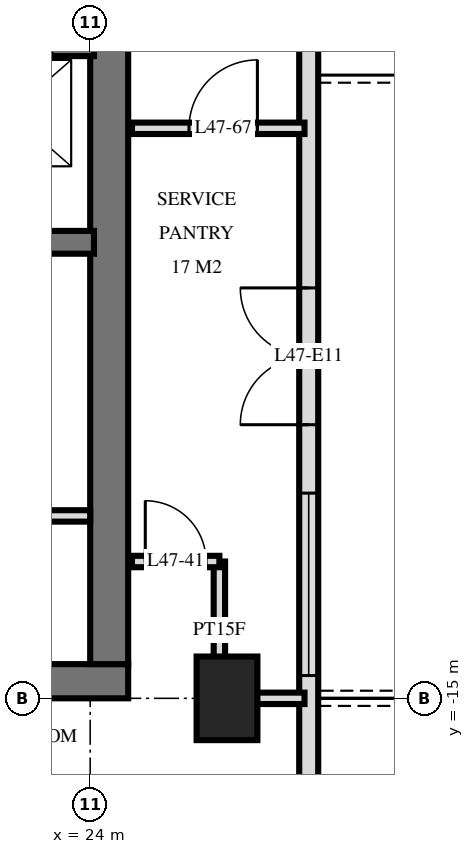
"""IFC4 building model, lengths in metres.
Left out: names, types, materials, properties, quantities, classifications, styles, units other than length and angle.
Written with IfcOpenShell. Run it as: python <this file> out.ifc"""

import sys

from ifc_helpers import new_model, si_unit, direction, frame, frame_2d, origin, origin_2d, place, context, subcontext, project, spatial, rectangle, extrude, element, fill, save


model = new_model("IFC4")
c1 = context("Model", 3, precision=1e-05, world=origin(), true_north=direction((0.0, 1.0)))
c2 = subcontext(c1, "Body", "Model", "MODEL_VIEW")
j1 = project(units=[si_unit("LENGTHUNIT", "METRE"), si_unit("PLANEANGLEUNIT", "RADIAN")], contexts=[c1])
p1 = place(None, origin())
s1 = spatial("IfcSite", under=j1, at=p1, CompositionType="ELEMENT")
p2 = place(p1, origin())
s2 = spatial("IfcBuilding", under=s1, at=p2, CompositionType="ELEMENT")
p3 = place(p2, frame((0.0, 0.0, 183.6)))
s3 = spatial("IfcBuildingStorey", under=s2, at=p3, CompositionType="ELEMENT", Elevation=183.6)
p4 = place(p3, frame((25.8, -15.0, -0.28), z_axis=(0.0, 0.0, 1.0), x_axis=(0.0, 1.0, 0.0)))
e1 = element("IfcColumn", 1, at=p4, inside=s3, PredefinedType="COLUMN", context=c2, shape_type="SweptSolid", body=[
    extrude(rectangle(XDim=1.1, YDim=0.8, at=origin_2d()), origin(), (0.0, 0.0, 1.0), 3.78),
])
p5 = place(p3, frame((10.0, -14.775, 0.0), z_axis=(0.0, 0.0, 1.0), x_axis=(1.0, 0.0, 0.0)))
e2 = element("IfcWall", 2, at=p5, inside=s3, PredefinedType="SHEAR", context=c2, shape_type="SweptSolid", body=[
    extrude(rectangle(XDim=14.5, YDim=0.45, at=frame_2d((7.25, 0.0))), origin(), (0.0, 0.0, 1.0), 3.5),
])
p6 = place(p5, frame((7.1, 0.0, 0.0)))
e3 = element("IfcOpeningElement", 3, at=p6, cuts=e2, PredefinedType="OPENING", context=c2, shape_type="SweptSolid", body=[
    extrude(rectangle(XDim=1.2, YDim=2.1, at=frame_2d((0.6, 1.05))), frame((0.0, 0.235, 0.0), z_axis=(0.0, -1.0, 0.0), x_axis=(1.0, 0.0, 0.0)), (0.0, 0.0, 1.0), 0.47),
])
p7 = place(p5, frame((4.15, 0.0, 0.0)))
e4 = element("IfcOpeningElement", 4, at=p7, cuts=e2, PredefinedType="OPENING", context=c2, shape_type="SweptSolid", body=[
    extrude(rectangle(XDim=1.1, YDim=2.1, at=frame_2d((0.55, 1.05))), frame((0.0, 0.235, 0.0), z_axis=(0.0, -1.0, 0.0), x_axis=(1.0, 0.0, 0.0)), (0.0, 0.0, 1.0), 0.47),
])
p8 = place(p5, frame((10.1, 0.0, 0.0)))
e5 = element("IfcOpeningElement", 5, at=p8, cuts=e2, PredefinedType="OPENING", context=c2, shape_type="SweptSolid", body=[
    extrude(rectangle(XDim=0.9, YDim=2.1, at=frame_2d((0.45, 1.05))), frame((0.0, 0.235, 0.0), z_axis=(0.0, -1.0, 0.0), x_axis=(1.0, 0.0, 0.0)), (0.0, 0.0, 1.0), 0.47),
])
p9 = place(p5, frame((12.45, 0.0, 0.0)))
e6 = element("IfcOpeningElement", 6, at=p9, cuts=e2, PredefinedType="OPENING", context=c2, shape_type="SweptSolid", body=[
    extrude(rectangle(XDim=1.0, YDim=2.1, at=frame_2d((0.5, 1.05))), frame((0.0, 0.235, 0.0), z_axis=(0.0, -1.0, 0.0), x_axis=(1.0, 0.0, 0.0)), (0.0, 0.0, 1.0), 0.47),
])
p10 = place(p3, frame((24.25, -14.55, 0.0), z_axis=(0.0, 0.0, 1.0), x_axis=(0.0, 1.0, 0.0)))
e7 = element("IfcWall", 7, at=p10, inside=s3, PredefinedType="SHEAR", context=c2, shape_type="SweptSolid", body=[
    extrude(rectangle(XDim=14.1, YDim=0.5, at=frame_2d((7.05, 0.0))), origin(), (0.0, 0.0, 1.0), 3.5),
])
p11 = place(p3, frame((10.35, -6.4, 0.0), z_axis=(0.0, 0.0, 1.0), x_axis=(1.0, 0.0, 0.0)))
e8 = element("IfcWall", 8, at=p11, inside=s3, PredefinedType="SHEAR", context=c2, shape_type="SweptSolid", body=[
    extrude(rectangle(XDim=13.7, YDim=0.3, at=frame_2d((6.85, 0.0))), origin(), (0.0, 0.0, 1.0), 3.5),
])
p12 = place(p11, frame((12.05, 0.0, 0.0)))
e9 = element("IfcOpeningElement", 9, at=p12, cuts=e8, PredefinedType="OPENING", context=c2, shape_type="SweptSolid", body=[
    extrude(rectangle(XDim=1.1, YDim=2.1, at=frame_2d((0.55, 1.05))), frame((0.0, 0.16, 0.0), z_axis=(0.0, -1.0, 0.0), x_axis=(1.0, 0.0, 0.0)), (0.0, 0.0, 1.0), 0.32),
])
p13 = place(p11, frame((6.8, 0.0, 0.0)))
e10 = element("IfcOpeningElement", 10, at=p13, cuts=e8, PredefinedType="OPENING", context=c2, shape_type="SweptSolid", body=[
    extrude(rectangle(XDim=1.1, YDim=2.1, at=frame_2d((0.55, 1.05))), frame((0.0, 0.16, 0.0), z_axis=(0.0, -1.0, 0.0), x_axis=(1.0, 0.0, 0.0)), (0.0, 0.0, 1.0), 0.32),
])
p14 = place(p3, frame((10.35, -9.0, 0.0), z_axis=(0.0, 0.0, 1.0), x_axis=(1.0, 0.0, 0.0)))
e11 = element("IfcWall", 11, at=p14, inside=s3, PredefinedType="SHEAR", context=c2, shape_type="SweptSolid", body=[
    extrude(rectangle(XDim=13.7, YDim=0.3, at=frame_2d((6.85, 0.0))), origin(), (0.0, 0.0, 1.0), 3.5),
])
p15 = place(p14, frame((3.8, 0.0, 0.0)))
e12 = element("IfcOpeningElement", 12, at=p15, cuts=e11, PredefinedType="OPENING", context=c2, shape_type="SweptSolid", body=[
    extrude(rectangle(XDim=1.1, YDim=2.1, at=frame_2d((0.55, 1.05))), frame((0.0, 0.16, 0.0), z_axis=(0.0, -1.0, 0.0), x_axis=(1.0, 0.0, 0.0)), (0.0, 0.0, 1.0), 0.32),
])
p16 = place(p3, frame((26.875, -24.875, 0.0), z_axis=(0.0, 0.0, 1.0), x_axis=(0.0, 1.0, 0.0)))
e13 = element("IfcWall", 13, at=p16, inside=s3, PredefinedType="SOLIDWALL", context=c2, shape_type="SweptSolid", body=[
    extrude(rectangle(XDim=21.551, YDim=0.25, at=frame_2d((10.775, 0.0))), origin(), (0.0, 0.0, 1.0), 3.22),
])
p17 = place(p16, frame((0.575, 0.0, 0.0)))
e14 = element("IfcOpeningElement", 14, at=p17, cuts=e13, PredefinedType="OPENING", context=c2, shape_type="SweptSolid", body=[
    extrude(rectangle(XDim=1.8, YDim=2.4, at=frame_2d((0.9, 1.2))), frame((0.0, 0.135, 0.0), z_axis=(0.0, -1.0, 0.0), x_axis=(1.0, 0.0, 0.0)), (0.0, 0.0, 1.0), 0.27),
])
p18 = place(p16, frame((5.675, 0.0, 0.0)))
e15 = element("IfcOpeningElement", 15, at=p18, cuts=e13, PredefinedType="OPENING", context=c2, shape_type="SweptSolid", body=[
    extrude(rectangle(XDim=1.8, YDim=2.4, at=frame_2d((0.9, 1.2))), frame((0.0, 0.135, 0.0), z_axis=(0.0, -1.0, 0.0), x_axis=(1.0, 0.0, 0.0)), (0.0, 0.0, 1.0), 0.27),
])
p19 = place(p16, frame((10.175, 0.0, 0.9)))
e16 = element("IfcOpeningElement", 16, at=p19, cuts=e13, PredefinedType="OPENING", context=c2, shape_type="SweptSolid", body=[
    extrude(rectangle(XDim=2.4, YDim=1.5, at=frame_2d((1.2, 0.75))), frame((0.0, 0.135, 0.0), z_axis=(0.0, -1.0, 0.0), x_axis=(1.0, 0.0, 0.0)), (0.0, 0.0, 1.0), 0.27),
])
p20 = place(p16, frame((13.475, 0.0, 0.0)))
e17 = element("IfcOpeningElement", 17, at=p20, cuts=e13, PredefinedType="OPENING", context=c2, shape_type="SweptSolid", body=[
    extrude(rectangle(XDim=1.8, YDim=2.4, at=frame_2d((0.9, 1.2))), frame((0.0, 0.135, 0.0), z_axis=(0.0, -1.0, 0.0), x_axis=(1.0, 0.0, 0.0)), (0.0, 0.0, 1.0), 0.27),
])
p21 = place(p3, frame((21.9, -12.6, 0.0), z_axis=(0.0, 0.0, 1.0), x_axis=(1.0, 0.0, 0.0)))
e18 = element("IfcWall", 18, at=p21, inside=s3, PredefinedType="PARTITIONING", context=c2, shape_type="SweptSolid", body=[
    extrude(rectangle(XDim=2.1, YDim=0.15, at=frame_2d((1.05, 0.0))), origin(), (0.0, 0.0, 1.0), 3.2),
])
p22 = place(p21, frame((0.55, 0.0, 0.0)))
e19 = element("IfcOpeningElement", 19, at=p22, cuts=e18, PredefinedType="OPENING", context=c2, shape_type="SweptSolid", body=[
    extrude(rectangle(XDim=1.0, YDim=2.1, at=frame_2d((0.5, 1.05))), frame((0.0, 0.085, 0.0), z_axis=(0.0, -1.0, 0.0), x_axis=(1.0, 0.0, 0.0)), (0.0, 0.0, 1.0), 0.17),
])
p23 = place(p3, frame((25.7, -15.0, 0.0), z_axis=(0.0, 0.0, 1.0), x_axis=(0.0, 1.0, 0.0)))
e20 = element("IfcWall", 20, at=p23, inside=s3, PredefinedType="PARTITIONING", context=c2, shape_type="SweptSolid", body=[
    extrude(rectangle(XDim=1.8, YDim=0.15, at=frame_2d((0.9, 0.0))), origin(), (0.0, 0.0, 1.0), 3.22),
])
p24 = place(p3, frame((25.7, -15.0, 0.0), z_axis=(0.0, 0.0, 1.0), x_axis=(1.0, 0.0, 0.0)))
e21 = element("IfcWall", 21, at=p24, inside=s3, PredefinedType="PARTITIONING", context=c2, shape_type="SweptSolid", body=[
    extrude(rectangle(XDim=1.12, YDim=0.15, at=frame_2d((0.56, 0.0))), origin(), (0.0, 0.0, 1.0), 3.22),
])
p25 = place(p3, frame((24.55, -13.2, 0.0), z_axis=(0.0, 0.0, 1.0), x_axis=(1.0, 0.0, 0.0)))
e22 = element("IfcWall", 22, at=p25, inside=s3, PredefinedType="PARTITIONING", context=c2, shape_type="SweptSolid", body=[
    extrude(rectangle(XDim=1.15, YDim=0.15, at=frame_2d((0.575, 0.0))), origin(), (0.0, 0.0, 1.0), 3.22),
])
p26 = place(p25, frame((0.175, 0.0, 0.0)))
e23 = element("IfcOpeningElement", 23, at=p26, cuts=e22, PredefinedType="OPENING", context=c2, shape_type="SweptSolid", body=[
    extrude(rectangle(XDim=0.8, YDim=2.1, at=frame_2d((0.4, 1.05))), frame((0.0, 0.085, 0.0), z_axis=(0.0, -1.0, 0.0), x_axis=(1.0, 0.0, 0.0)), (0.0, 0.0, 1.0), 0.17),
])
p27 = place(p3, frame((24.55, -7.5, 0.0), z_axis=(0.0, 0.0, 1.0), x_axis=(1.0, 0.0, 0.0)))
e24 = element("IfcWall", 24, at=p27, inside=s3, PredefinedType="PARTITIONING", context=c2, shape_type="SweptSolid", body=[
    extrude(rectangle(XDim=2.27, YDim=0.15, at=frame_2d((1.135, 0.0))), origin(), (0.0, 0.0, 1.0), 3.22),
])
p28 = place(p27, frame((0.75, 0.0, 0.0)))
e25 = element("IfcOpeningElement", 25, at=p28, cuts=e24, PredefinedType="OPENING", context=c2, shape_type="SweptSolid", body=[
    extrude(rectangle(XDim=0.9, YDim=2.1, at=frame_2d((0.45, 1.05))), frame((0.0, 0.085, 0.0), z_axis=(0.0, -1.0, 0.0), x_axis=(1.0, 0.0, 0.0)), (0.0, 0.0, 1.0), 0.17),
])
p29 = place(p19, origin())
e26 = element("IfcWindow", 26, at=p29, inside=s3, PartitioningType="SINGLE_PANEL", PredefinedType="WINDOW", context=c2, shape_type="SweptSolid", body=[
    extrude(rectangle(XDim=2.4, YDim=1.5, at=frame_2d((1.2, 0.75))), frame((0.0, 0.03, 0.0), z_axis=(0.0, -1.0, 0.0), x_axis=(1.0, 0.0, 0.0)), (0.0, 0.0, 1.0), 0.06),
])
fill(e16, e26)
p30 = place(p20, origin())
e27 = element("IfcDoor", 27, at=p30, inside=s3, OperationType="DOUBLE_DOOR_SINGLE_SWING", PredefinedType="DOOR", context=c2, shape_type="SweptSolid", body=[
    extrude(rectangle(XDim=1.8, YDim=2.4, at=frame_2d((0.9, 1.2))), frame((0.0, 0.025, 0.0), z_axis=(0.0, -1.0, 0.0), x_axis=(1.0, 0.0, 0.0)), (0.0, 0.0, 1.0), 0.05),
])
fill(e17, e27)
p31 = place(p26, origin())
e28 = element("IfcDoor", 28, at=p31, inside=s3, OperationType="SINGLE_SWING_RIGHT", PredefinedType="DOOR", context=c2, shape_type="SweptSolid", body=[
    extrude(rectangle(XDim=0.8, YDim=2.1, at=frame_2d((0.4, 1.05))), frame((0.0, 0.025, 0.0), z_axis=(0.0, -1.0, 0.0), x_axis=(1.0, 0.0, 0.0)), (0.0, 0.0, 1.0), 0.05),
])
fill(e23, e28)
p32 = place(p28, origin())
e29 = element("IfcDoor", 29, at=p32, inside=s3, OperationType="SINGLE_SWING_LEFT", PredefinedType="DOOR", context=c2, shape_type="SweptSolid", body=[
    extrude(rectangle(XDim=0.9, YDim=2.1, at=frame_2d((0.45, 1.05))), frame((0.0, 0.025, 0.0), z_axis=(0.0, -1.0, 0.0), x_axis=(1.0, 0.0, 0.0)), (0.0, 0.0, 1.0), 0.05),
])
fill(e25, e29)
save(model, sys.argv[1])
